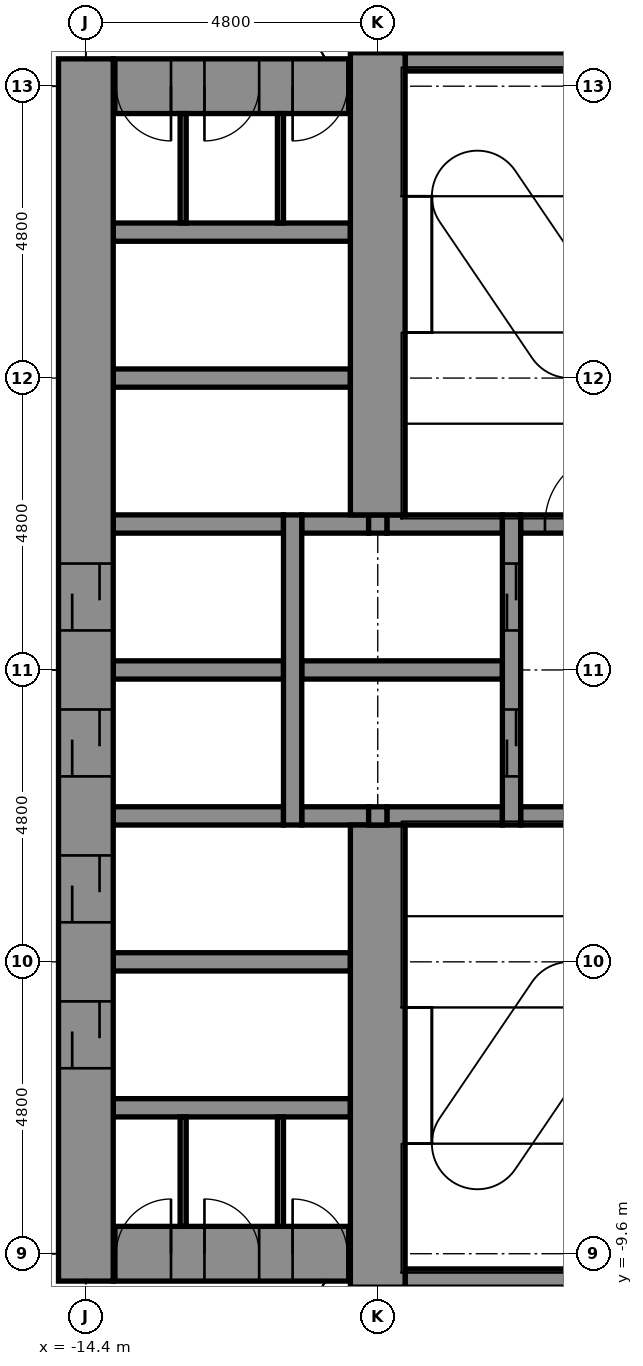
"""IFC4 building model, lengths in metres.
Left out: names, types, materials, properties, quantities, classifications, styles, units other than length and angle.
Written with IfcOpenShell. Run it as: python <this file> out.ifc"""

import sys

from ifc_helpers import new_model, si_unit, direction, frame, frame_2d, origin, place, context, subcontext, project, spatial, rectangle, extrude, element, fill, save


model = new_model("IFC4")
c1 = context("Model", 3, precision=1e-05, world=origin(), true_north=direction((0.0, 1.0)))
c2 = subcontext(c1, "Body", "Model", "MODEL_VIEW")
j1 = project(units=[si_unit("LENGTHUNIT", "METRE"), si_unit("PLANEANGLEUNIT", "RADIAN")], contexts=[c1])
p1 = place(None, origin())
s1 = spatial("IfcSite", under=j1, at=p1, CompositionType="ELEMENT")
p2 = place(p1, origin())
s2 = spatial("IfcBuilding", under=s1, at=p2, CompositionType="ELEMENT")
p3 = place(p2, frame((0.0, 0.0, 127.4)))
s3 = spatial("IfcBuildingStorey", under=s2, at=p3, CompositionType="ELEMENT", Elevation=127.4)
p4 = place(p3, frame((-9.15, -10.0, -0.3), z_axis=(0.0, 0.0, 1.0), x_axis=(1.0, 0.0, 0.0)))
e1 = element("IfcWall", 1, at=p4, inside=s3, PredefinedType="STANDARD", context=c2, shape_type="SweptSolid", body=[
    extrude(rectangle(XDim=3.9, YDim=0.3, at=frame_2d((1.95, 0.0))), origin(), (0.0, 0.0, 1.0), 6.15),
])
p5 = place(p3, frame((-13.95, -9.6, -0.3), z_axis=(0.0, 0.0, 1.0), x_axis=(1.0, 0.0, 0.0)))
e2 = element("IfcWall", 2, at=p5, inside=s3, PredefinedType="SHEAR", context=c2, shape_type="SweptSolid", body=[
    extrude(rectangle(XDim=3.9, YDim=0.9, at=frame_2d((1.95, 0.0))), origin(), (0.0, 0.0, 1.0), 6.15),
])
p6 = place(p5, frame((0.05, 0.0, 0.3)))
e3 = element("IfcOpeningElement", 3, at=p6, cuts=e2, PredefinedType="OPENING", context=c2, shape_type="SweptSolid", body=[
    extrude(rectangle(XDim=0.9, YDim=2.1, at=frame_2d((0.45, 1.05))), frame((0.0, 0.46, 0.0), z_axis=(0.0, -1.0, 0.0), x_axis=(1.0, 0.0, 0.0)), (0.0, 0.0, 1.0), 0.92),
])
p7 = place(p5, frame((1.5, 0.0, 0.3)))
e4 = element("IfcOpeningElement", 4, at=p7, cuts=e2, PredefinedType="OPENING", context=c2, shape_type="SweptSolid", body=[
    extrude(rectangle(XDim=0.9, YDim=2.1, at=frame_2d((0.45, 1.05))), frame((0.0, 0.46, 0.0), z_axis=(0.0, -1.0, 0.0), x_axis=(1.0, 0.0, 0.0)), (0.0, 0.0, 1.0), 0.92),
])
p8 = place(p5, frame((2.95, 0.0, 0.3)))
e5 = element("IfcOpeningElement", 5, at=p8, cuts=e2, PredefinedType="OPENING", context=c2, shape_type="SweptSolid", body=[
    extrude(rectangle(XDim=0.9, YDim=2.1, at=frame_2d((0.45, 1.05))), frame((0.0, 0.46, 0.0), z_axis=(0.0, -1.0, 0.0), x_axis=(1.0, 0.0, 0.0)), (0.0, 0.0, 1.0), 0.92),
])
p9 = place(p3, frame((-13.95, -7.2, -0.3), z_axis=(0.0, 0.0, 1.0), x_axis=(1.0, 0.0, 0.0)))
e6 = element("IfcWall", 6, at=p9, inside=s3, PredefinedType="STANDARD", context=c2, shape_type="SweptSolid", body=[
    extrude(rectangle(XDim=3.9, YDim=0.3, at=frame_2d((1.95, 0.0))), origin(), (0.0, 0.0, 1.0), 6.15),
])
p10 = place(p3, frame((-13.95, -4.8, -0.3), z_axis=(0.0, 0.0, 1.0), x_axis=(1.0, 0.0, 0.0)))
e7 = element("IfcWall", 7, at=p10, inside=s3, PredefinedType="STANDARD", context=c2, shape_type="SweptSolid", body=[
    extrude(rectangle(XDim=3.9, YDim=0.3, at=frame_2d((1.95, 0.0))), origin(), (0.0, 0.0, 1.0), 4.7),
])
p11 = place(p3, frame((-13.95, -2.4, -0.3), z_axis=(0.0, 0.0, 1.0), x_axis=(1.0, 0.0, 0.0)))
e8 = element("IfcWall", 8, at=p11, inside=s3, PredefinedType="STANDARD", context=c2, shape_type="SweptSolid", body=[
    extrude(rectangle(XDim=2.8, YDim=0.3, at=frame_2d((1.4, 0.0))), origin(), (0.0, 0.0, 1.0), 4.7),
])
p12 = place(p3, frame((-10.85, -2.4, -0.3), z_axis=(0.0, 0.0, 1.0), x_axis=(1.0, 0.0, 0.0)))
e9 = element("IfcWall", 9, at=p12, inside=s3, PredefinedType="STANDARD", context=c2, shape_type="SweptSolid", body=[
    extrude(rectangle(XDim=1.1, YDim=0.3, at=frame_2d((0.55, 0.0))), origin(), (0.0, 0.0, 1.0), 6.15),
])
p13 = place(p3, frame((-9.45, -2.4, -0.3), z_axis=(0.0, 0.0, 1.0), x_axis=(1.0, 0.0, 0.0)))
e10 = element("IfcWall", 10, at=p13, inside=s3, PredefinedType="STANDARD", context=c2, shape_type="SweptSolid", body=[
    extrude(rectangle(XDim=1.9, YDim=0.3, at=frame_2d((0.95, 0.0))), origin(), (0.0, 0.0, 1.0), 6.15),
])
p14 = place(p3, frame((-7.25, -2.4, -0.3), z_axis=(0.0, 0.0, 1.0), x_axis=(1.0, 0.0, 0.0)))
e11 = element("IfcWall", 11, at=p14, inside=s3, PredefinedType="STANDARD", context=c2, shape_type="SweptSolid", body=[
    extrude(rectangle(XDim=2.0, YDim=0.3, at=frame_2d((1.0, 0.0))), origin(), (0.0, 0.0, 1.0), 6.15),
])
p15 = place(p3, frame((-13.95, 0.0, -0.3), z_axis=(0.0, 0.0, 1.0), x_axis=(1.0, 0.0, 0.0)))
e12 = element("IfcWall", 12, at=p15, inside=s3, PredefinedType="STANDARD", context=c2, shape_type="SweptSolid", body=[
    extrude(rectangle(XDim=2.8, YDim=0.3, at=frame_2d((1.4, 0.0))), origin(), (0.0, 0.0, 1.0), 4.7),
])
p16 = place(p3, frame((-10.85, 0.0, -0.3), z_axis=(0.0, 0.0, 1.0), x_axis=(1.0, 0.0, 0.0)))
e13 = element("IfcWall", 13, at=p16, inside=s3, PredefinedType="STANDARD", context=c2, shape_type="SweptSolid", body=[
    extrude(rectangle(XDim=3.3, YDim=0.3, at=frame_2d((1.65, 0.0))), origin(), (0.0, 0.0, 1.0), 6.15),
])
p17 = place(p3, frame((-13.95, 2.4, -0.3), z_axis=(0.0, 0.0, 1.0), x_axis=(1.0, 0.0, 0.0)))
e14 = element("IfcWall", 14, at=p17, inside=s3, PredefinedType="STANDARD", context=c2, shape_type="SweptSolid", body=[
    extrude(rectangle(XDim=2.8, YDim=0.3, at=frame_2d((1.4, 0.0))), origin(), (0.0, 0.0, 1.0), 6.15),
])
p18 = place(p3, frame((-10.85, 2.4, -0.3), z_axis=(0.0, 0.0, 1.0), x_axis=(1.0, 0.0, 0.0)))
e15 = element("IfcWall", 15, at=p18, inside=s3, PredefinedType="STANDARD", context=c2, shape_type="SweptSolid", body=[
    extrude(rectangle(XDim=1.1, YDim=0.3, at=frame_2d((0.55, 0.0))), origin(), (0.0, 0.0, 1.0), 6.15),
])
p19 = place(p3, frame((-9.45, 2.4, -0.3), z_axis=(0.0, 0.0, 1.0), x_axis=(1.0, 0.0, 0.0)))
e16 = element("IfcWall", 16, at=p19, inside=s3, PredefinedType="STANDARD", context=c2, shape_type="SweptSolid", body=[
    extrude(rectangle(XDim=1.9, YDim=0.3, at=frame_2d((0.95, 0.0))), origin(), (0.0, 0.0, 1.0), 6.15),
])
p20 = place(p3, frame((-7.25, 2.4, -0.3), z_axis=(0.0, 0.0, 1.0), x_axis=(1.0, 0.0, 0.0)))
e17 = element("IfcWall", 17, at=p20, inside=s3, PredefinedType="STANDARD", context=c2, shape_type="SweptSolid", body=[
    extrude(rectangle(XDim=2.0, YDim=0.3, at=frame_2d((1.0, 0.0))), origin(), (0.0, 0.0, 1.0), 6.15),
])
p21 = place(p20, frame((0.4, 0.0, 0.3)))
e18 = element("IfcOpeningElement", 18, at=p21, cuts=e17, PredefinedType="OPENING", context=c2, shape_type="SweptSolid", body=[
    extrude(rectangle(XDim=1.2, YDim=2.1, at=frame_2d((0.6, 1.05))), frame((0.0, 0.16, 0.0), z_axis=(0.0, -1.0, 0.0), x_axis=(1.0, 0.0, 0.0)), (0.0, 0.0, 1.0), 0.32),
])
for number, where, z_axis, x_axis in (
    (19, (-13.95, 4.8, -0.3), (0.0, 0.0, 1.0), (1.0, 0.0, 0.0)),
    (20, (-13.95, 7.2, -0.3), (0.0, 0.0, 1.0), (1.0, 0.0, 0.0)),
):
    element("IfcWall", number, at=place(p3, frame(where, z_axis=z_axis, x_axis=x_axis)), inside=s3, PredefinedType="STANDARD", context=c2, shape_type="SweptSolid", body=[
        extrude(rectangle(XDim=3.9, YDim=0.3, at=frame_2d((1.95, 0.0))), origin(), (0.0, 0.0, 1.0), 6.15),
    ])
p22 = place(p3, frame((-13.95, 9.6, -0.3), z_axis=(0.0, 0.0, 1.0), x_axis=(1.0, 0.0, 0.0)))
e21 = element("IfcWall", 21, at=p22, inside=s3, PredefinedType="SHEAR", context=c2, shape_type="SweptSolid", body=[
    extrude(rectangle(XDim=3.9, YDim=0.9, at=frame_2d((1.95, 0.0))), origin(), (0.0, 0.0, 1.0), 6.15),
])
p23 = place(p22, frame((0.05, 0.0, 0.3)))
e22 = element("IfcOpeningElement", 22, at=p23, cuts=e21, PredefinedType="OPENING", context=c2, shape_type="SweptSolid", body=[
    extrude(rectangle(XDim=0.9, YDim=2.1, at=frame_2d((0.45, 1.05))), frame((0.0, 0.46, 0.0), z_axis=(0.0, -1.0, 0.0), x_axis=(1.0, 0.0, 0.0)), (0.0, 0.0, 1.0), 0.92),
])
p24 = place(p22, frame((1.5, 0.0, 0.3)))
e23 = element("IfcOpeningElement", 23, at=p24, cuts=e21, PredefinedType="OPENING", context=c2, shape_type="SweptSolid", body=[
    extrude(rectangle(XDim=0.9, YDim=2.1, at=frame_2d((0.45, 1.05))), frame((0.0, 0.46, 0.0), z_axis=(0.0, -1.0, 0.0), x_axis=(1.0, 0.0, 0.0)), (0.0, 0.0, 1.0), 0.92),
])
p25 = place(p22, frame((2.95, 0.0, 0.3)))
e24 = element("IfcOpeningElement", 24, at=p25, cuts=e21, PredefinedType="OPENING", context=c2, shape_type="SweptSolid", body=[
    extrude(rectangle(XDim=0.9, YDim=2.1, at=frame_2d((0.45, 1.05))), frame((0.0, 0.46, 0.0), z_axis=(0.0, -1.0, 0.0), x_axis=(1.0, 0.0, 0.0)), (0.0, 0.0, 1.0), 0.92),
])
p26 = place(p3, frame((-9.15, 10.0, -0.3), z_axis=(0.0, 0.0, 1.0), x_axis=(1.0, 0.0, 0.0)))
e25 = element("IfcWall", 25, at=p26, inside=s3, PredefinedType="STANDARD", context=c2, shape_type="SweptSolid", body=[
    extrude(rectangle(XDim=3.9, YDim=0.3, at=frame_2d((1.95, 0.0))), origin(), (0.0, 0.0, 1.0), 6.15),
])
p27 = place(p3, frame((-14.4, -10.05, -0.3), z_axis=(0.0, 0.0, 1.0), x_axis=(0.0, 1.0, 0.0)))
e26 = element("IfcWall", 26, at=p27, inside=s3, PredefinedType="SHEAR", context=c2, shape_type="SweptSolid", body=[
    extrude(rectangle(XDim=20.1, YDim=0.9, at=frame_2d((10.05, 0.0))), origin(), (0.0, 0.0, 1.0), 6.15),
])
p28 = place(p27, frame((3.5, 0.0, 0.3)))
e27 = element("IfcOpeningElement", 27, at=p28, cuts=e26, PredefinedType="OPENING", context=c2, shape_type="SweptSolid", body=[
    extrude(rectangle(XDim=1.1, YDim=2.1, at=frame_2d((0.55, 1.05))), frame((0.0, 0.46, 0.0), z_axis=(0.0, -1.0, 0.0), x_axis=(1.0, 0.0, 0.0)), (0.0, 0.0, 1.0), 0.92),
])
p29 = place(p27, frame((5.9, 0.0, 0.3)))
e28 = element("IfcOpeningElement", 28, at=p29, cuts=e26, PredefinedType="OPENING", context=c2, shape_type="SweptSolid", body=[
    extrude(rectangle(XDim=1.1, YDim=2.1, at=frame_2d((0.55, 1.05))), frame((0.0, 0.46, 0.0), z_axis=(0.0, -1.0, 0.0), x_axis=(1.0, 0.0, 0.0)), (0.0, 0.0, 1.0), 0.92),
])
p30 = place(p27, frame((8.3, 0.0, 0.3)))
e29 = element("IfcOpeningElement", 29, at=p30, cuts=e26, PredefinedType="OPENING", context=c2, shape_type="SweptSolid", body=[
    extrude(rectangle(XDim=1.1, YDim=2.1, at=frame_2d((0.55, 1.05))), frame((0.0, 0.46, 0.0), z_axis=(0.0, -1.0, 0.0), x_axis=(1.0, 0.0, 0.0)), (0.0, 0.0, 1.0), 0.92),
])
p31 = place(p27, frame((10.7, 0.0, 0.3)))
e30 = element("IfcOpeningElement", 30, at=p31, cuts=e26, PredefinedType="OPENING", context=c2, shape_type="SweptSolid", body=[
    extrude(rectangle(XDim=1.1, YDim=2.1, at=frame_2d((0.55, 1.05))), frame((0.0, 0.46, 0.0), z_axis=(0.0, -1.0, 0.0), x_axis=(1.0, 0.0, 0.0)), (0.0, 0.0, 1.0), 0.92),
])
p32 = place(p3, frame((-11.0, -2.55, -0.3), z_axis=(0.0, 0.0, 1.0), x_axis=(0.0, 1.0, 0.0)))
e31 = element("IfcWall", 31, at=p32, inside=s3, PredefinedType="STANDARD", context=c2, shape_type="SweptSolid", body=[
    extrude(rectangle(XDim=5.1, YDim=0.3, at=frame_2d((2.55, 0.0))), origin(), (0.0, 0.0, 1.0), 6.15),
])
p33 = place(p3, frame((-9.6, -10.15, -0.3), z_axis=(0.0, 0.0, 1.0), x_axis=(0.0, 1.0, 0.0)))
e32 = element("IfcWall", 32, at=p33, inside=s3, PredefinedType="SHEAR", context=c2, shape_type="SweptSolid", body=[
    extrude(rectangle(XDim=7.6, YDim=0.9, at=frame_2d((3.8, 0.0))), origin(), (0.0, 0.0, 1.0), 6.15),
])
for number, where, z_axis, x_axis in (
    (33, (-9.6, -2.55, -0.3), (0.0, 0.0, 1.0), (0.0, 1.0, 0.0)),
    (34, (-9.6, 2.25, -0.3), (0.0, 0.0, 1.0), (0.0, 1.0, 0.0)),
):
    element("IfcWall", number, at=place(p3, frame(where, z_axis=z_axis, x_axis=x_axis)), inside=s3, PredefinedType="STANDARD", context=c2, shape_type="SweptSolid", body=[
        extrude(rectangle(XDim=0.3, YDim=0.3, at=frame_2d((0.15, 0.0))), origin(), (0.0, 0.0, 1.0), 6.15),
    ])
p34 = place(p3, frame((-9.6, 2.55, -0.3), z_axis=(0.0, 0.0, 1.0), x_axis=(0.0, 1.0, 0.0)))
e35 = element("IfcWall", 35, at=p34, inside=s3, PredefinedType="SHEAR", context=c2, shape_type="SweptSolid", body=[
    extrude(rectangle(XDim=7.6, YDim=0.9, at=frame_2d((3.8, 0.0))), origin(), (0.0, 0.0, 1.0), 6.15),
])
p35 = place(p3, frame((-7.4, -2.55, -0.3), z_axis=(0.0, 0.0, 1.0), x_axis=(0.0, 1.0, 0.0)))
e36 = element("IfcWall", 36, at=p35, inside=s3, PredefinedType="STANDARD", context=c2, shape_type="SweptSolid", body=[
    extrude(rectangle(XDim=5.1, YDim=0.3, at=frame_2d((2.55, 0.0))), origin(), (0.0, 0.0, 1.0), 6.15),
])
p36 = place(p35, frame((0.8, 0.0, 0.3)))
e37 = element("IfcOpeningElement", 37, at=p36, cuts=e36, PredefinedType="OPENING", context=c2, shape_type="SweptSolid", body=[
    extrude(rectangle(XDim=1.1, YDim=2.1, at=frame_2d((0.55, 1.05))), frame((0.0, 0.16, 0.0), z_axis=(0.0, -1.0, 0.0), x_axis=(1.0, 0.0, 0.0)), (0.0, 0.0, 1.0), 0.32),
])
p37 = place(p35, frame((3.2, 0.0, 0.3)))
e38 = element("IfcOpeningElement", 38, at=p37, cuts=e36, PredefinedType="OPENING", context=c2, shape_type="SweptSolid", body=[
    extrude(rectangle(XDim=1.1, YDim=2.1, at=frame_2d((0.55, 1.05))), frame((0.0, 0.16, 0.0), z_axis=(0.0, -1.0, 0.0), x_axis=(1.0, 0.0, 0.0)), (0.0, 0.0, 1.0), 0.32),
])
for number, where, z_axis, x_axis in (
    (39, (-11.2, -9.15, 0.0), (0.0, 0.0, 1.0), (0.0, 1.0, 0.0)),
    (40, (-11.2, 7.35, 0.0), (0.0, 0.0, 1.0), (0.0, 1.0, 0.0)),
    (41, (-12.8, -9.15, 0.0), (0.0, 0.0, 1.0), (0.0, 1.0, 0.0)),
    (42, (-12.8, 7.35, 0.0), (0.0, 0.0, 1.0), (0.0, 1.0, 0.0)),
):
    element("IfcWall", number, at=place(p3, frame(where, z_axis=z_axis, x_axis=x_axis)), inside=s3, PredefinedType="PARTITIONING", context=c2, shape_type="SweptSolid", body=[
        extrude(rectangle(XDim=1.8, YDim=0.1, at=frame_2d((0.9, 0.0))), origin(), (0.0, 0.0, 1.0), 5.85),
    ])
p38 = place(p36, origin())
e43 = element("IfcDoor", 43, at=p38, inside=s3, OperationType="DOUBLE_DOOR_SLIDING", PredefinedType="DOOR", context=c2, shape_type="SweptSolid", body=[
    extrude(rectangle(XDim=1.1, YDim=2.1, at=frame_2d((0.55, 1.05))), frame((0.0, 0.025, 0.0), z_axis=(0.0, -1.0, 0.0), x_axis=(1.0, 0.0, 0.0)), (0.0, 0.0, 1.0), 0.05),
])
fill(e37, e43)
p39 = place(p37, origin())
e44 = element("IfcDoor", 44, at=p39, inside=s3, OperationType="DOUBLE_DOOR_SLIDING", PredefinedType="DOOR", context=c2, shape_type="SweptSolid", body=[
    extrude(rectangle(XDim=1.1, YDim=2.1, at=frame_2d((0.55, 1.05))), frame((0.0, 0.025, 0.0), z_axis=(0.0, -1.0, 0.0), x_axis=(1.0, 0.0, 0.0)), (0.0, 0.0, 1.0), 0.05),
])
fill(e38, e44)
p40 = place(p28, origin())
e45 = element("IfcDoor", 45, at=p40, inside=s3, OperationType="DOUBLE_DOOR_SLIDING", PredefinedType="DOOR", context=c2, shape_type="SweptSolid", body=[
    extrude(rectangle(XDim=1.1, YDim=2.1, at=frame_2d((0.55, 1.05))), frame((0.0, 0.025, 0.0), z_axis=(0.0, -1.0, 0.0), x_axis=(1.0, 0.0, 0.0)), (0.0, 0.0, 1.0), 0.05),
])
fill(e27, e45)
p41 = place(p29, origin())
e46 = element("IfcDoor", 46, at=p41, inside=s3, OperationType="DOUBLE_DOOR_SLIDING", PredefinedType="DOOR", context=c2, shape_type="SweptSolid", body=[
    extrude(rectangle(XDim=1.1, YDim=2.1, at=frame_2d((0.55, 1.05))), frame((0.0, 0.025, 0.0), z_axis=(0.0, -1.0, 0.0), x_axis=(1.0, 0.0, 0.0)), (0.0, 0.0, 1.0), 0.05),
])
fill(e28, e46)
p42 = place(p30, origin())
e47 = element("IfcDoor", 47, at=p42, inside=s3, OperationType="DOUBLE_DOOR_SLIDING", PredefinedType="DOOR", context=c2, shape_type="SweptSolid", body=[
    extrude(rectangle(XDim=1.1, YDim=2.1, at=frame_2d((0.55, 1.05))), frame((0.0, 0.025, 0.0), z_axis=(0.0, -1.0, 0.0), x_axis=(1.0, 0.0, 0.0)), (0.0, 0.0, 1.0), 0.05),
])
fill(e29, e47)
p43 = place(p31, origin())
e48 = element("IfcDoor", 48, at=p43, inside=s3, OperationType="DOUBLE_DOOR_SLIDING", PredefinedType="DOOR", context=c2, shape_type="SweptSolid", body=[
    extrude(rectangle(XDim=1.1, YDim=2.1, at=frame_2d((0.55, 1.05))), frame((0.0, 0.025, 0.0), z_axis=(0.0, -1.0, 0.0), x_axis=(1.0, 0.0, 0.0)), (0.0, 0.0, 1.0), 0.05),
])
fill(e30, e48)
p44 = place(p6, origin())
e49 = element("IfcDoor", 49, at=p44, inside=s3, OperationType="SINGLE_SWING_RIGHT", PredefinedType="DOOR", context=c2, shape_type="SweptSolid", body=[
    extrude(rectangle(XDim=0.9, YDim=2.1, at=frame_2d((0.45, 1.05))), frame((0.0, 0.025, 0.0), z_axis=(0.0, -1.0, 0.0), x_axis=(1.0, 0.0, 0.0)), (0.0, 0.0, 1.0), 0.05),
])
fill(e3, e49)
p45 = place(p7, origin())
e50 = element("IfcDoor", 50, at=p45, inside=s3, OperationType="SINGLE_SWING_LEFT", PredefinedType="DOOR", context=c2, shape_type="SweptSolid", body=[
    extrude(rectangle(XDim=0.9, YDim=2.1, at=frame_2d((0.45, 1.05))), frame((0.0, 0.025, 0.0), z_axis=(0.0, -1.0, 0.0), x_axis=(1.0, 0.0, 0.0)), (0.0, 0.0, 1.0), 0.05),
])
fill(e4, e50)
p46 = place(p8, origin())
e51 = element("IfcDoor", 51, at=p46, inside=s3, OperationType="SINGLE_SWING_LEFT", PredefinedType="DOOR", context=c2, shape_type="SweptSolid", body=[
    extrude(rectangle(XDim=0.9, YDim=2.1, at=frame_2d((0.45, 1.05))), frame((0.0, 0.025, 0.0), z_axis=(0.0, -1.0, 0.0), x_axis=(1.0, 0.0, 0.0)), (0.0, 0.0, 1.0), 0.05),
])
fill(e5, e51)
p47 = place(p23, frame((0.9, 0.0, 0.0), z_axis=(0.0, 0.0, 1.0), x_axis=(-1.0, 0.0, 0.0)))
e52 = element("IfcDoor", 52, at=p47, inside=s3, OperationType="SINGLE_SWING_RIGHT", PredefinedType="DOOR", context=c2, shape_type="SweptSolid", body=[
    extrude(rectangle(XDim=0.9, YDim=2.1, at=frame_2d((0.45, 1.05))), frame((0.0, 0.025, 0.0), z_axis=(0.0, -1.0, 0.0), x_axis=(1.0, 0.0, 0.0)), (0.0, 0.0, 1.0), 0.05),
])
fill(e22, e52)
p48 = place(p24, frame((0.9, 0.0, 0.0), z_axis=(0.0, 0.0, 1.0), x_axis=(-1.0, 0.0, 0.0)))
e53 = element("IfcDoor", 53, at=p48, inside=s3, OperationType="SINGLE_SWING_LEFT", PredefinedType="DOOR", context=c2, shape_type="SweptSolid", body=[
    extrude(rectangle(XDim=0.9, YDim=2.1, at=frame_2d((0.45, 1.05))), frame((0.0, 0.025, 0.0), z_axis=(0.0, -1.0, 0.0), x_axis=(1.0, 0.0, 0.0)), (0.0, 0.0, 1.0), 0.05),
])
fill(e23, e53)
p49 = place(p25, frame((0.9, 0.0, 0.0), z_axis=(0.0, 0.0, 1.0), x_axis=(-1.0, 0.0, 0.0)))
e54 = element("IfcDoor", 54, at=p49, inside=s3, OperationType="SINGLE_SWING_LEFT", PredefinedType="DOOR", context=c2, shape_type="SweptSolid", body=[
    extrude(rectangle(XDim=0.9, YDim=2.1, at=frame_2d((0.45, 1.05))), frame((0.0, 0.025, 0.0), z_axis=(0.0, -1.0, 0.0), x_axis=(1.0, 0.0, 0.0)), (0.0, 0.0, 1.0), 0.05),
])
fill(e24, e54)
p50 = place(p21, origin())
e55 = element("IfcDoor", 55, at=p50, inside=s3, OperationType="SINGLE_SWING_RIGHT", PredefinedType="DOOR", context=c2, shape_type="SweptSolid", body=[
    extrude(rectangle(XDim=1.2, YDim=2.1, at=frame_2d((0.6, 1.05))), frame((0.0, 0.025, 0.0), z_axis=(0.0, -1.0, 0.0), x_axis=(1.0, 0.0, 0.0)), (0.0, 0.0, 1.0), 0.05),
])
fill(e18, e55)
save(model, sys.argv[1])
